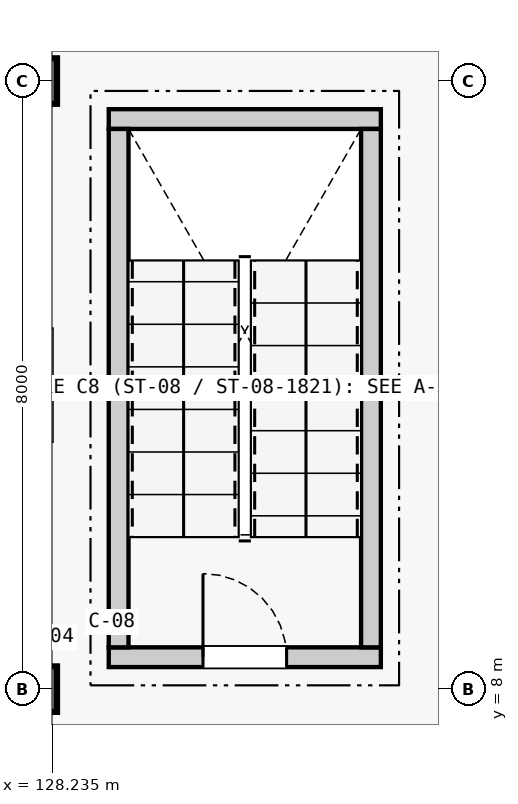
"""IFC4 building model, lengths in metres.
Left out: names, types, materials, properties, quantities, classifications, styles, units other than length and angle.
Written with IfcOpenShell. Run it as: python <this file> out.ifc"""

import sys

from ifc_helpers import new_model, si_unit, direction, frame, frame_2d, origin, origin_2d, place, context, subcontext, project, spatial, rectangle, extrude, element, fill, save


model = new_model("IFC4")
c1 = context("Model", 3, precision=1e-05, world=origin(), true_north=direction((0.0, 1.0)))
c2 = subcontext(c1, "Body", "Model", "MODEL_VIEW")
j1 = project(units=[si_unit("LENGTHUNIT", "METRE"), si_unit("PLANEANGLEUNIT", "RADIAN")], contexts=[c1])
p1 = place(None, origin())
s1 = spatial("IfcSite", under=j1, at=p1, CompositionType="ELEMENT")
p2 = place(p1, origin())
s2 = spatial("IfcBuilding", under=s1, at=p2, CompositionType="ELEMENT")
p3 = place(p2, frame((0.0, 0.0, 5.4)))
s3 = spatial("IfcBuildingStorey", under=s2, at=p3, CompositionType="ELEMENT", Elevation=5.4)
for number, where, z_axis, x_axis in (
    (1, (128.0, 8.0, 0.0), (0.0, 0.0, 1.0), (1.0, 0.0, 0.0)),
    (2, (128.0, 16.0, 0.0), (0.0, 0.0, 1.0), (1.0, 0.0, 0.0)),
):
    element("IfcColumn", number, at=place(p3, frame(where, z_axis=z_axis, x_axis=x_axis)), inside=s3, PredefinedType="COLUMN", context=c2, shape_type="SweptSolid", body=[
        extrude(rectangle(XDim=0.6, YDim=0.6, at=origin_2d()), origin(), (0.0, 0.0, 1.0), 5.1),
    ])
p4 = place(p3, frame((128.98, 8.42, 0.0), z_axis=(0.0, 0.0, 1.0), x_axis=(1.0, 0.0, 0.0)))
e3 = element("IfcWall", 3, at=p4, inside=s3, PredefinedType="SOLIDWALL", context=c2, shape_type="SweptSolid", body=[
    extrude(rectangle(XDim=3.58, YDim=0.26, at=frame_2d((1.79, 0.0))), origin(), (0.0, 0.0, 1.0), 5.1),
])
p5 = place(p4, frame((1.24, 0.0, 0.0)))
e4 = element("IfcOpeningElement", 4, at=p5, cuts=e3, PredefinedType="OPENING", context=c2, shape_type="SweptSolid", body=[
    extrude(rectangle(XDim=1.1, YDim=2.2, at=frame_2d((0.55, 1.1))), frame((0.0, 0.142, 0.0), z_axis=(0.0, -1.0, 0.0), x_axis=(1.0, 0.0, 0.0)), (0.0, 0.0, 1.0), 0.284),
])
p6 = place(p3, frame((128.98, 15.5, 0.0), z_axis=(0.0, 0.0, 1.0), x_axis=(1.0, 0.0, 0.0)))
e5 = element("IfcWall", 5, at=p6, inside=s3, PredefinedType="SOLIDWALL", context=c2, shape_type="SweptSolid", body=[
    extrude(rectangle(XDim=3.58, YDim=0.26, at=frame_2d((1.79, 0.0))), origin(), (0.0, 0.0, 1.0), 5.1),
])
for number, where, z_axis, x_axis in (
    (6, (129.11, 8.55, 0.0), (0.0, 0.0, 1.0), (0.0, 1.0, 0.0)),
    (7, (132.43, 8.55, 0.0), (0.0, 0.0, 1.0), (0.0, 1.0, 0.0)),
):
    element("IfcWall", number, at=place(p3, frame(where, z_axis=z_axis, x_axis=x_axis)), inside=s3, PredefinedType="SOLIDWALL", context=c2, shape_type="SweptSolid", body=[
        extrude(rectangle(XDim=6.82, YDim=0.26, at=frame_2d((3.41, 0.0))), origin(), (0.0, 0.0, 1.0), 5.1),
    ])
p7 = place(p5, origin())
e8 = element("IfcDoor", 8, at=p7, inside=s3, OperationType="SINGLE_SWING_LEFT", PredefinedType="DOOR", context=c2, shape_type="SweptSolid", body=[
    extrude(rectangle(XDim=1.1, YDim=2.2, at=frame_2d((0.55, 1.1))), frame((0.0, 0.025, 0.0), z_axis=(0.0, -1.0, 0.0), x_axis=(1.0, 0.0, 0.0)), (0.0, 0.0, 1.0), 0.05),
])
fill(e4, e8)
save(model, sys.argv[1])
